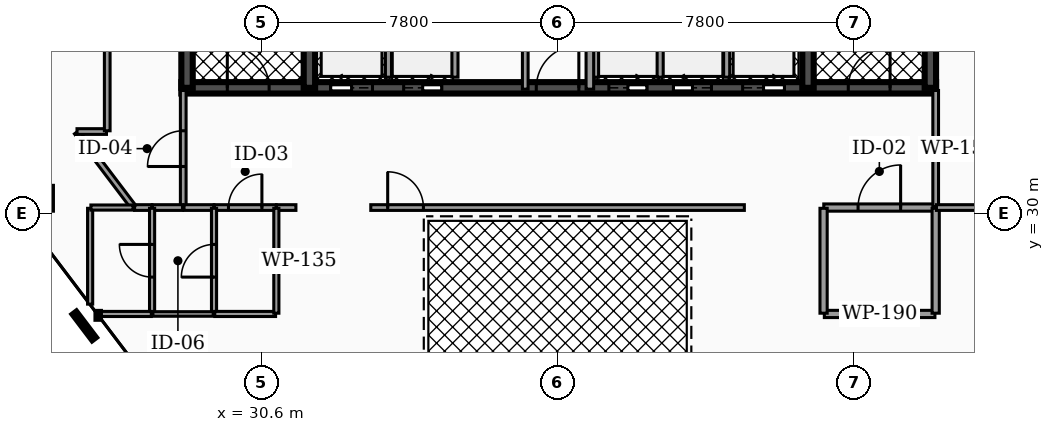
"""IFC4 building model, lengths in metres.
Left out: names, types, materials, properties, quantities, classifications, styles, units other than length and angle.
Written with IfcOpenShell. Run it as: python <this file> out.ifc"""

import sys

from ifc_helpers import new_model, si_unit, direction, frame, frame_2d, origin, origin_2d, place, context, subcontext, project, spatial, rectangle, hollow_rectangle, extrude, element, fill, save


model = new_model("IFC4")
c1 = context("Model", 3, precision=1e-05, world=origin(), true_north=direction((0.0, 1.0)))
c2 = subcontext(c1, "Body", "Model", "MODEL_VIEW")
j1 = project(units=[si_unit("LENGTHUNIT", "METRE"), si_unit("PLANEANGLEUNIT", "RADIAN")], contexts=[c1])
p1 = place(None, origin())
s1 = spatial("IfcSite", under=j1, at=p1, CompositionType="ELEMENT")
p2 = place(p1, origin())
s2 = spatial("IfcBuilding", under=s1, at=p2, CompositionType="ELEMENT")
p3 = place(p2, frame((0.0, 0.0, 246.16)))
s3 = spatial("IfcBuildingStorey", under=s2, at=p3, CompositionType="ELEMENT", Elevation=246.16)
p4 = place(p3, frame((28.5, 33.3, 0.0), z_axis=(0.0, 0.0, 1.0), x_axis=(1.0, 0.0, 0.0)))
e1 = element("IfcWall", 1, at=p4, inside=s3, PredefinedType="SHEAR", context=c2, shape_type="SweptSolid", body=[
    extrude(rectangle(XDim=19.86, YDim=0.3, at=frame_2d((9.93, 0.0))), origin(), (0.0, 0.0, 1.0), 3.18),
])
p5 = place(p4, frame((3.93, 0.0, 0.0)))
e2 = element("IfcOpeningElement", 2, at=p5, cuts=e1, PredefinedType="OPENING", context=c2, shape_type="SweptSolid", body=[
    extrude(rectangle(XDim=1.1, YDim=2.15, at=frame_2d((0.55, 1.075))), frame((0.0, 0.16, 0.0), z_axis=(0.0, -1.0, 0.0), x_axis=(1.0, 0.0, 0.0)), (0.0, 0.0, 1.0), 0.32),
])
p6 = place(p4, frame((14.77, 0.0, 0.0)))
e3 = element("IfcOpeningElement", 3, at=p6, cuts=e1, PredefinedType="OPENING", context=c2, shape_type="SweptSolid", body=[
    extrude(rectangle(XDim=1.1, YDim=2.15, at=frame_2d((0.55, 1.075))), frame((0.0, 0.16, 0.0), z_axis=(0.0, -1.0, 0.0), x_axis=(1.0, 0.0, 0.0)), (0.0, 0.0, 1.0), 0.32),
])
p7 = place(p4, frame((11.25, 0.0, 0.0)))
e4 = element("IfcOpeningElement", 4, at=p7, cuts=e1, PredefinedType="OPENING", context=c2, shape_type="SweptSolid", body=[
    extrude(rectangle(XDim=1.0, YDim=2.1, at=frame_2d((0.5, 1.05))), frame((0.0, 0.16, 0.0), z_axis=(0.0, -1.0, 0.0), x_axis=(1.0, 0.0, 0.0)), (0.0, 0.0, 1.0), 0.32),
])
p8 = place(p4, frame((12.95, 0.0, 0.0)))
e5 = element("IfcOpeningElement", 5, at=p8, cuts=e1, PredefinedType="OPENING", context=c2, shape_type="SweptSolid", body=[
    extrude(rectangle(XDim=1.0, YDim=2.1, at=frame_2d((0.5, 1.05))), frame((0.0, 0.16, 0.0), z_axis=(0.0, -1.0, 0.0), x_axis=(1.0, 0.0, 0.0)), (0.0, 0.0, 1.0), 0.32),
])
p9 = place(p4, frame((5.85, 0.0, 0.0)))
e6 = element("IfcOpeningElement", 6, at=p9, cuts=e1, PredefinedType="OPENING", context=c2, shape_type="SweptSolid", body=[
    extrude(rectangle(XDim=1.0, YDim=2.1, at=frame_2d((0.5, 1.05))), frame((0.0, 0.16, 0.0), z_axis=(0.0, -1.0, 0.0), x_axis=(1.0, 0.0, 0.0)), (0.0, 0.0, 1.0), 0.32),
])
p10 = place(p4, frame((1.21, 0.0, 0.0)))
e7 = element("IfcOpeningElement", 7, at=p10, cuts=e1, PredefinedType="OPENING", context=c2, shape_type="SweptSolid", body=[
    extrude(rectangle(XDim=1.1, YDim=2.2, at=frame_2d((0.55, 1.1))), frame((0.0, 0.16, 0.0), z_axis=(0.0, -1.0, 0.0), x_axis=(1.0, 0.0, 0.0)), (0.0, 0.0, 1.0), 0.32),
])
p11 = place(p4, frame((9.34, 0.0, 0.0)))
e8 = element("IfcOpeningElement", 8, at=p11, cuts=e1, PredefinedType="OPENING", context=c2, shape_type="SweptSolid", body=[
    extrude(rectangle(XDim=1.12, YDim=2.05, at=frame_2d((0.56, 1.025))), frame((0.0, 0.16, 0.0), z_axis=(0.0, -1.0, 0.0), x_axis=(1.0, 0.0, 0.0)), (0.0, 0.0, 1.0), 0.32),
])
p12 = place(p4, frame((17.55, 0.0, 0.0)))
e9 = element("IfcOpeningElement", 9, at=p12, cuts=e1, PredefinedType="OPENING", context=c2, shape_type="SweptSolid", body=[
    extrude(rectangle(XDim=1.1, YDim=2.2, at=frame_2d((0.55, 1.1))), frame((0.0, 0.16, 0.0), z_axis=(0.0, -1.0, 0.0), x_axis=(1.0, 0.0, 0.0)), (0.0, 0.0, 1.0), 0.32),
])
for number, where, z_axis, x_axis in (
    (10, (28.65, 33.3, 0.0), (0.0, 0.0, 1.0), (0.0, 1.0, 0.0)),
    (11, (31.87, 33.3, 0.0), (0.0, 0.0, 1.0), (0.0, 1.0, 0.0)),
    (12, (44.99, 33.3, 0.0), (0.0, 0.0, 1.0), (0.0, 1.0, 0.0)),
    (13, (48.21, 33.3, 0.0), (0.0, 0.0, 1.0), (0.0, 1.0, 0.0)),
):
    element("IfcWall", number, at=place(p3, frame(where, z_axis=z_axis, x_axis=x_axis)), inside=s3, PredefinedType="SHEAR", context=c2, shape_type="SweptSolid", body=[
        extrude(rectangle(XDim=10.1, YDim=0.3, at=frame_2d((5.05, 0.0))), origin(), (0.0, 0.0, 1.0), 3.18),
    ])
p13 = place(p3, frame((24.794, 30.394, 0.0), z_axis=(0.081334382112, 0.096489384022, 0.992005300922), x_axis=(-0.764598124332, 0.644507337637, 0.0)))
e14 = element("IfcColumn", 14, at=p13, inside=s3, PredefinedType="COLUMN", context=c2, shape_type="SweptSolid", body=[
    extrude(hollow_rectangle(XDim=0.6, YDim=0.6, WallThickness=0.03, at=origin_2d()), origin(), (0.0, 0.0, 1.0), 3.206),
])
for number, where, z_axis, x_axis in (
    (15, (33.95, 33.58, 0.0), (0.0, 0.0, 1.0), (0.0, 1.0, 0.0)),
    (16, (42.85, 33.58, 0.0), (0.0, 0.0, 1.0), (0.0, 1.0, 0.0)),
):
    element("IfcWall", number, at=place(p3, frame(where, z_axis=z_axis, x_axis=x_axis)), inside=s3, PredefinedType="SOLIDWALL", context=c2, shape_type="SweptSolid", body=[
        extrude(rectangle(XDim=2.45, YDim=0.16, at=frame_2d((1.225, 0.0))), origin(), (0.0, 0.0, 1.0), 3.18),
    ])
for number, where, z_axis, x_axis in (
    (17, (39.4, 33.58, 0.0), (0.0, 0.0, 1.0), (0.0, 1.0, 0.0)),
    (18, (41.1, 33.58, 0.0), (0.0, 0.0, 1.0), (0.0, 1.0, 0.0)),
    (19, (35.7, 33.58, 0.0), (0.0, 0.0, 1.0), (0.0, 1.0, 0.0)),
):
    element("IfcWall", number, at=place(p3, frame(where, z_axis=z_axis, x_axis=x_axis)), inside=s3, PredefinedType="SOLIDWALL", context=c2, shape_type="SweptSolid", body=[
        extrude(rectangle(XDim=2.25, YDim=0.16, at=frame_2d((1.125, 0.0))), origin(), (0.0, 0.0, 1.0), 3.18),
    ])
p14 = place(p3, frame((37.55, 33.265, 0.0), z_axis=(0.0, 0.0, 1.0), x_axis=(0.0, 1.0, 0.0)))
e20 = element("IfcWall", 20, at=p14, inside=s3, PredefinedType="PARTITIONING", context=c2, shape_type="SweptSolid", body=[
    extrude(rectangle(XDim=3.615, YDim=0.15, at=frame_2d((1.808, 0.0))), origin(), (0.0, 0.0, 1.0), 2.235),
])
p15 = place(p14, frame((1.337, 0.0, 0.0)))
e21 = element("IfcOpeningElement", 21, at=p15, cuts=e20, PredefinedType="OPENING", context=c2, shape_type="SweptSolid", body=[
    extrude(rectangle(XDim=0.94, YDim=2.05, at=frame_2d((0.47, 1.025))), frame((0.0, 0.085, 0.0), z_axis=(0.0, -1.0, 0.0), x_axis=(1.0, 0.0, 0.0)), (0.0, 0.0, 1.0), 0.17),
])
p16 = place(p3, frame((39.25, 33.265, 0.0), z_axis=(0.0, 0.0, 1.0), x_axis=(0.0, 1.0, 0.0)))
e22 = element("IfcWall", 22, at=p16, inside=s3, PredefinedType="PARTITIONING", context=c2, shape_type="SweptSolid", body=[
    extrude(rectangle(XDim=3.615, YDim=0.2, at=frame_2d((1.808, 0.0))), origin(), (0.0, 0.0, 1.0), 2.235),
])
p17 = place(p3, frame((45.405, 30.15, 0.0), z_axis=(0.0, 0.0, 1.0), x_axis=(1.0, 0.0, 0.0)))
e23 = element("IfcWall", 23, at=p17, inside=s3, PredefinedType="PARTITIONING", context=c2, shape_type="SweptSolid", body=[
    extrude(rectangle(XDim=2.925, YDim=0.19, at=frame_2d((1.462, 0.0))), origin(), (0.0, 0.0, 1.0), 2.235),
])
p18 = place(p17, frame((0.903, 0.0, 0.0)))
e24 = element("IfcOpeningElement", 24, at=p18, cuts=e23, PredefinedType="OPENING", context=c2, shape_type="SweptSolid", body=[
    extrude(rectangle(XDim=1.12, YDim=2.05, at=frame_2d((0.56, 1.025))), frame((0.0, 0.105, 0.0), z_axis=(0.0, -1.0, 0.0), x_axis=(1.0, 0.0, 0.0)), (0.0, 0.0, 1.0), 0.21),
])
p19 = place(p3, frame((28.55, 30.17, 0.0), z_axis=(0.0, 0.0, 1.0), x_axis=(0.0, 1.0, 0.0)))
e25 = element("IfcWall", 25, at=p19, inside=s3, PredefinedType="PARTITIONING", context=c2, shape_type="SweptSolid", body=[
    extrude(rectangle(XDim=3.06, YDim=0.15, at=frame_2d((1.53, 0.0))), origin(), (0.0, 0.0, 1.0), 2.235),
])
p20 = place(p19, frame((1.06, 0.0, 0.0)))
e26 = element("IfcOpeningElement", 26, at=p20, cuts=e25, PredefinedType="OPENING", context=c2, shape_type="SweptSolid", body=[
    extrude(rectangle(XDim=0.94, YDim=2.05, at=frame_2d((0.47, 1.025))), frame((0.0, 0.085, 0.0), z_axis=(0.0, -1.0, 0.0), x_axis=(1.0, 0.0, 0.0)), (0.0, 0.0, 1.0), 0.17),
])
p21 = place(p3, frame((48.35, 30.17, 0.0), z_axis=(0.0, 0.0, 1.0), x_axis=(0.0, 1.0, 0.0)))
e27 = element("IfcWall", 27, at=p21, inside=s3, PredefinedType="PARTITIONING", context=c2, shape_type="SweptSolid", body=[
    extrude(rectangle(XDim=3.06, YDim=0.15, at=frame_2d((1.53, 0.0))), origin(), (0.0, 0.0, 1.0), 2.235),
])
p22 = place(p3, frame((29.365, 30.15, 0.0), z_axis=(0.0, 0.0, 1.0), x_axis=(1.0, 0.0, 0.0)))
e28 = element("IfcWall", 28, at=p22, inside=s3, PredefinedType="PARTITIONING", context=c2, shape_type="SweptSolid", body=[
    extrude(rectangle(XDim=1.63, YDim=0.15, at=frame_2d((0.815, 0.0))), origin(), (0.0, 0.0, 1.0), 2.235),
])
p23 = place(p22, frame((0.375, 0.0, 0.0)))
e29 = element("IfcOpeningElement", 29, at=p23, cuts=e28, PredefinedType="OPENING", context=c2, shape_type="SweptSolid", body=[
    extrude(rectangle(XDim=0.88, YDim=2.05, at=frame_2d((0.44, 1.025))), frame((0.0, 0.085, 0.0), z_axis=(0.0, -1.0, 0.0), x_axis=(1.0, 0.0, 0.0)), (0.0, 0.0, 1.0), 0.17),
])
p24 = place(p3, frame((28.57, 30.15, 0.0), z_axis=(0.0, 0.0, 1.0), x_axis=(1.0, 0.0, 0.0)))
e30 = element("IfcWall", 30, at=p24, inside=s3, PredefinedType="PARTITIONING", context=c2, shape_type="SweptSolid", body=[
    extrude(rectangle(XDim=0.785, YDim=0.15, at=frame_2d((0.393, 0.0))), origin(), (0.0, 0.0, 1.0), 2.235),
])
p25 = place(p3, frame((33.485, 30.15, 0.0), z_axis=(0.0, 0.0, 1.0), x_axis=(1.0, 0.0, 0.0)))
e31 = element("IfcWall", 31, at=p25, inside=s3, PredefinedType="PARTITIONING", context=c2, shape_type="SweptSolid", body=[
    extrude(rectangle(XDim=9.83, YDim=0.15, at=frame_2d((4.915, 0.0))), origin(), (0.0, 0.0, 1.0), 2.235),
])
p26 = place(p25, frame((0.445, 0.0, 0.0)))
e32 = element("IfcOpeningElement", 32, at=p26, cuts=e31, PredefinedType="OPENING", context=c2, shape_type="SweptSolid", body=[
    extrude(rectangle(XDim=0.94, YDim=2.05, at=frame_2d((0.47, 1.025))), frame((0.0, 0.085, 0.0), z_axis=(0.0, -1.0, 0.0), x_axis=(1.0, 0.0, 0.0)), (0.0, 0.0, 1.0), 0.17),
])
p27 = place(p3, frame((31.005, 30.15, 0.0), z_axis=(0.0, 0.0, 1.0), x_axis=(1.0, 0.0, 0.0)))
e33 = element("IfcWall", 33, at=p27, inside=s3, PredefinedType="PARTITIONING", context=c2, shape_type="SweptSolid", body=[
    extrude(rectangle(XDim=0.51, YDim=0.15, at=frame_2d((0.255, 0.0))), origin(), (0.0, 0.0, 1.0), 2.235),
])
p28 = place(p3, frame((45.42, 27.35, 0.0), z_axis=(0.0, 0.0, 1.0), x_axis=(1.0, 0.0, 0.0)))
e34 = element("IfcWall", 34, at=p28, inside=s3, PredefinedType="PARTITIONING", context=c2, shape_type="SweptSolid", body=[
    extrude(rectangle(XDim=2.91, YDim=0.19, at=frame_2d((1.455, 0.0))), origin(), (0.0, 0.0, 1.0), 2.235),
])
for number, where, z_axis, x_axis in (
    (35, (45.4, 27.37, 0.0), (0.0, 0.0, 1.0), (0.0, 1.0, 0.0)),
    (36, (48.35, 27.37, 0.0), (0.0, 0.0, 1.0), (0.0, 1.0, 0.0)),
):
    element("IfcWall", number, at=place(p3, frame(where, z_axis=z_axis, x_axis=x_axis)), inside=s3, PredefinedType="PARTITIONING", context=c2, shape_type="SweptSolid", body=[
        extrude(rectangle(XDim=2.76, YDim=0.19, at=frame_2d((1.38, 0.0))), origin(), (0.0, 0.0, 1.0), 2.235),
    ])
p29 = place(p3, frame((27.27, 30.15, 0.0), z_axis=(0.0, 0.0, 1.0), x_axis=(1.0, 0.0, 0.0)))
e37 = element("IfcWall", 37, at=p29, inside=s3, PredefinedType="PARTITIONING", context=c2, shape_type="SweptSolid", body=[
    extrude(rectangle(XDim=0.455, YDim=0.15, at=frame_2d((0.228, 0.0))), origin(), (0.0, 0.0, 1.0), 2.235),
])
p30 = place(p3, frame((27.735, 30.15, 0.0), z_axis=(0.0, 0.0, 1.0), x_axis=(1.0, 0.0, 0.0)))
e38 = element("IfcWall", 38, at=p30, inside=s3, PredefinedType="PARTITIONING", context=c2, shape_type="SweptSolid", body=[
    extrude(rectangle(XDim=0.795, YDim=0.15, at=frame_2d((0.397, 0.0))), origin(), (0.0, 0.0, 1.0), 2.235),
])
p31 = place(p3, frame((48.37, 30.15, 0.0), z_axis=(0.0, 0.0, 1.0), x_axis=(1.0, 0.0, 0.0)))
e39 = element("IfcWall", 39, at=p31, inside=s3, PredefinedType="PARTITIONING", context=c2, shape_type="SweptSolid", body=[
    extrude(rectangle(XDim=1.16, YDim=0.15, at=frame_2d((0.58, 0.0))), origin(), (0.0, 0.0, 1.0), 2.235),
])
p32 = place(p3, frame((25.747, 32.134, 0.0), z_axis=(0.0, 0.0, 1.0), x_axis=(0.603931928578, -0.797035899847, 0.0)))
e40 = element("IfcWall", 40, at=p32, inside=s3, PredefinedType="PARTITIONING", context=c2, shape_type="SweptSolid", body=[
    extrude(rectangle(XDim=2.469, YDim=0.15, at=frame_2d((1.235, 0.0))), origin(), (0.0, 0.0, 1.0), 2.235),
])
p33 = place(p3, frame((25.755, 32.15, 0.0), z_axis=(0.0, 0.0, 1.0), x_axis=(1.0, 0.0, 0.0)))
e41 = element("IfcWall", 41, at=p33, inside=s3, PredefinedType="PARTITIONING", context=c2, shape_type="SweptSolid", body=[
    extrude(rectangle(XDim=0.775, YDim=0.15, at=frame_2d((0.388, 0.0))), origin(), (0.0, 0.0, 1.0), 2.235),
])
p34 = place(p3, frame((26.55, 32.17, 0.0), z_axis=(0.0, 0.0, 1.0), x_axis=(0.0, 1.0, 0.0)))
e42 = element("IfcWall", 42, at=p34, inside=s3, PredefinedType="PARTITIONING", context=c2, shape_type="SweptSolid", body=[
    extrude(rectangle(XDim=11.38, YDim=0.15, at=frame_2d((5.69, 0.0))), origin(), (0.0, 0.0, 1.0), 2.235),
])
p35 = place(p34, frame((5.22, 0.0, 0.0)))
e43 = element("IfcOpeningElement", 43, at=p35, cuts=e42, PredefinedType="OPENING", context=c2, shape_type="SweptSolid", body=[
    extrude(rectangle(XDim=0.94, YDim=2.05, at=frame_2d((0.47, 1.025))), frame((0.0, 0.085, 0.0), z_axis=(0.0, -1.0, 0.0), x_axis=(1.0, 0.0, 0.0)), (0.0, 0.0, 1.0), 0.17),
])
p36 = place(p3, frame((29.36, 27.37, 0.0), z_axis=(0.0, 0.0, 1.0), x_axis=(0.0, 1.0, 0.0)))
e44 = element("IfcWall", 44, at=p36, inside=s3, PredefinedType="PARTITIONING", context=c2, shape_type="SweptSolid", body=[
    extrude(rectangle(XDim=2.76, YDim=0.135, at=frame_2d((1.38, 0.0))), origin(), (0.0, 0.0, 1.0), 2.235),
])
p37 = place(p36, frame((0.95, 0.0, 0.0)))
e45 = element("IfcOpeningElement", 45, at=p37, cuts=e44, PredefinedType="OPENING", context=c2, shape_type="SweptSolid", body=[
    extrude(rectangle(XDim=0.86, YDim=2.05, at=frame_2d((0.43, 1.025))), frame((0.0, 0.077, 0.0), z_axis=(0.0, -1.0, 0.0), x_axis=(1.0, 0.0, 0.0)), (0.0, 0.0, 1.0), 0.155),
])
p38 = place(p3, frame((29.38, 27.35, 0.0), z_axis=(0.0, 0.0, 1.0), x_axis=(1.0, 0.0, 0.0)))
e46 = element("IfcWall", 46, at=p38, inside=s3, PredefinedType="PARTITIONING", context=c2, shape_type="SweptSolid", body=[
    extrude(rectangle(XDim=1.6, YDim=0.135, at=frame_2d((0.8, 0.0))), origin(), (0.0, 0.0, 1.0), 2.235),
])
p39 = place(p3, frame((31.0, 27.37, 0.0), z_axis=(0.0, 0.0, 1.0), x_axis=(0.0, 1.0, 0.0)))
e47 = element("IfcWall", 47, at=p39, inside=s3, PredefinedType="PARTITIONING", context=c2, shape_type="SweptSolid", body=[
    extrude(rectangle(XDim=2.76, YDim=0.135, at=frame_2d((1.38, 0.0))), origin(), (0.0, 0.0, 1.0), 2.235),
])
p40 = place(p3, frame((27.73, 27.37, 0.0), z_axis=(0.0, 0.0, 1.0), x_axis=(0.0, 1.0, 0.0)))
e48 = element("IfcWall", 48, at=p40, inside=s3, PredefinedType="PARTITIONING", context=c2, shape_type="SweptSolid", body=[
    extrude(rectangle(XDim=2.76, YDim=0.135, at=frame_2d((1.38, 0.0))), origin(), (0.0, 0.0, 1.0), 2.235),
])
p41 = place(p40, frame((0.95, 0.0, 0.0)))
e49 = element("IfcOpeningElement", 49, at=p41, cuts=e48, PredefinedType="OPENING", context=c2, shape_type="SweptSolid", body=[
    extrude(rectangle(XDim=0.86, YDim=2.05, at=frame_2d((0.43, 1.025))), frame((0.0, 0.077, 0.0), z_axis=(0.0, -1.0, 0.0), x_axis=(1.0, 0.0, 0.0)), (0.0, 0.0, 1.0), 0.155),
])
p42 = place(p3, frame((26.3, 27.35, 0.0), z_axis=(0.0, 0.0, 1.0), x_axis=(1.0, 0.0, 0.0)))
e50 = element("IfcWall", 50, at=p42, inside=s3, PredefinedType="PARTITIONING", context=c2, shape_type="SweptSolid", body=[
    extrude(rectangle(XDim=1.41, YDim=0.135, at=frame_2d((0.705, 0.0))), origin(), (0.0, 0.0, 1.0), 2.235),
])
p43 = place(p3, frame((26.1, 27.609, 0.0), z_axis=(0.0, 0.0, 1.0), x_axis=(0.0, 1.0, 0.0)))
e51 = element("IfcWall", 51, at=p43, inside=s3, PredefinedType="PARTITIONING", context=c2, shape_type="SweptSolid", body=[
    extrude(rectangle(XDim=2.521, YDim=0.135, at=frame_2d((1.26, 0.0))), origin(), (0.0, 0.0, 1.0), 2.235),
])
p44 = place(p3, frame((26.12, 30.15, 0.0), z_axis=(0.0, 0.0, 1.0), x_axis=(1.0, 0.0, 0.0)))
e52 = element("IfcWall", 52, at=p44, inside=s3, PredefinedType="PARTITIONING", context=c2, shape_type="SweptSolid", body=[
    extrude(rectangle(XDim=1.11, YDim=0.135, at=frame_2d((0.555, 0.0))), origin(), (0.0, 0.0, 1.0), 2.235),
])
p45 = place(p3, frame((27.75, 27.35, 0.0), z_axis=(0.0, 0.0, 1.0), x_axis=(1.0, 0.0, 0.0)))
e53 = element("IfcWall", 53, at=p45, inside=s3, PredefinedType="PARTITIONING", context=c2, shape_type="SweptSolid", body=[
    extrude(rectangle(XDim=1.59, YDim=0.12, at=frame_2d((0.795, 0.0))), origin(), (0.0, 0.0, 1.0), 2.235),
])
p46 = place(p5, origin())
e54 = element("IfcDoor", 54, at=p46, inside=s3, OperationType="SLIDING_TO_LEFT", PredefinedType="DOOR", context=c2, shape_type="SweptSolid", body=[
    extrude(rectangle(XDim=1.1, YDim=2.15, at=frame_2d((0.55, 1.075))), frame((0.0, 0.025, 0.0), z_axis=(0.0, -1.0, 0.0), x_axis=(1.0, 0.0, 0.0)), (0.0, 0.0, 1.0), 0.05),
])
fill(e2, e54)
p47 = place(p6, origin())
e55 = element("IfcDoor", 55, at=p47, inside=s3, OperationType="SLIDING_TO_RIGHT", PredefinedType="DOOR", context=c2, shape_type="SweptSolid", body=[
    extrude(rectangle(XDim=1.1, YDim=2.15, at=frame_2d((0.55, 1.075))), frame((0.0, 0.025, 0.0), z_axis=(0.0, -1.0, 0.0), x_axis=(1.0, 0.0, 0.0)), (0.0, 0.0, 1.0), 0.05),
])
fill(e3, e55)
p48 = place(p7, origin())
e56 = element("IfcDoor", 56, at=p48, inside=s3, OperationType="SLIDING_TO_RIGHT", PredefinedType="DOOR", context=c2, shape_type="SweptSolid", body=[
    extrude(rectangle(XDim=1.0, YDim=2.1, at=frame_2d((0.5, 1.05))), frame((0.0, 0.025, 0.0), z_axis=(0.0, -1.0, 0.0), x_axis=(1.0, 0.0, 0.0)), (0.0, 0.0, 1.0), 0.05),
])
fill(e4, e56)
p49 = place(p8, origin())
e57 = element("IfcDoor", 57, at=p49, inside=s3, OperationType="SLIDING_TO_LEFT", PredefinedType="DOOR", context=c2, shape_type="SweptSolid", body=[
    extrude(rectangle(XDim=1.0, YDim=2.1, at=frame_2d((0.5, 1.05))), frame((0.0, 0.025, 0.0), z_axis=(0.0, -1.0, 0.0), x_axis=(1.0, 0.0, 0.0)), (0.0, 0.0, 1.0), 0.05),
])
fill(e5, e57)
p50 = place(p9, origin())
e58 = element("IfcDoor", 58, at=p50, inside=s3, OperationType="SLIDING_TO_RIGHT", PredefinedType="DOOR", context=c2, shape_type="SweptSolid", body=[
    extrude(rectangle(XDim=1.0, YDim=2.1, at=frame_2d((0.5, 1.05))), frame((0.0, 0.025, 0.0), z_axis=(0.0, -1.0, 0.0), x_axis=(1.0, 0.0, 0.0)), (0.0, 0.0, 1.0), 0.05),
])
fill(e6, e58)
p51 = place(p10, origin())
e59 = element("IfcDoor", 59, at=p51, inside=s3, OperationType="SINGLE_SWING_LEFT", PredefinedType="DOOR", context=c2, shape_type="SweptSolid", body=[
    extrude(rectangle(XDim=1.1, YDim=2.2, at=frame_2d((0.55, 1.1))), frame((0.0, 0.025, 0.0), z_axis=(0.0, -1.0, 0.0), x_axis=(1.0, 0.0, 0.0)), (0.0, 0.0, 1.0), 0.05),
])
fill(e7, e59)
p52 = place(p11, origin())
e60 = element("IfcDoor", 60, at=p52, inside=s3, OperationType="SINGLE_SWING_RIGHT", PredefinedType="DOOR", context=c2, shape_type="SweptSolid", body=[
    extrude(rectangle(XDim=1.12, YDim=2.05, at=frame_2d((0.56, 1.025))), frame((0.0, 0.025, 0.0), z_axis=(0.0, -1.0, 0.0), x_axis=(1.0, 0.0, 0.0)), (0.0, 0.0, 1.0), 0.05),
])
fill(e8, e60)
p53 = place(p12, origin())
e61 = element("IfcDoor", 61, at=p53, inside=s3, OperationType="SINGLE_SWING_RIGHT", PredefinedType="DOOR", context=c2, shape_type="SweptSolid", body=[
    extrude(rectangle(XDim=1.1, YDim=2.2, at=frame_2d((0.55, 1.1))), frame((0.0, 0.025, 0.0), z_axis=(0.0, -1.0, 0.0), x_axis=(1.0, 0.0, 0.0)), (0.0, 0.0, 1.0), 0.05),
])
fill(e9, e61)
p54 = place(p18, origin())
e62 = element("IfcDoor", 62, at=p54, inside=s3, OperationType="SINGLE_SWING_RIGHT", PredefinedType="DOOR", context=c2, shape_type="SweptSolid", body=[
    extrude(rectangle(XDim=1.12, YDim=2.05, at=frame_2d((0.56, 1.025))), frame((0.0, 0.025, 0.0), z_axis=(0.0, -1.0, 0.0), x_axis=(1.0, 0.0, 0.0)), (0.0, 0.0, 1.0), 0.05),
])
fill(e24, e62)
p55 = place(p20, origin())
e63 = element("IfcDoor", 63, at=p55, inside=s3, OperationType="SINGLE_SWING_LEFT", PredefinedType="DOOR", context=c2, shape_type="SweptSolid", body=[
    extrude(rectangle(XDim=0.94, YDim=2.05, at=frame_2d((0.47, 1.025))), frame((0.0, 0.025, 0.0), z_axis=(0.0, -1.0, 0.0), x_axis=(1.0, 0.0, 0.0)), (0.0, 0.0, 1.0), 0.05),
])
fill(e26, e63)
p56 = place(p23, origin())
e64 = element("IfcDoor", 64, at=p56, inside=s3, OperationType="SINGLE_SWING_RIGHT", PredefinedType="DOOR", context=c2, shape_type="SweptSolid", body=[
    extrude(rectangle(XDim=0.88, YDim=2.05, at=frame_2d((0.44, 1.025))), frame((0.0, 0.025, 0.0), z_axis=(0.0, -1.0, 0.0), x_axis=(1.0, 0.0, 0.0)), (0.0, 0.0, 1.0), 0.05),
])
fill(e29, e64)
p57 = place(p26, origin())
e65 = element("IfcDoor", 65, at=p57, inside=s3, OperationType="SINGLE_SWING_LEFT", PredefinedType="DOOR", context=c2, shape_type="SweptSolid", body=[
    extrude(rectangle(XDim=0.94, YDim=2.05, at=frame_2d((0.47, 1.025))), frame((0.0, 0.025, 0.0), z_axis=(0.0, -1.0, 0.0), x_axis=(1.0, 0.0, 0.0)), (0.0, 0.0, 1.0), 0.05),
])
fill(e32, e65)
p58 = place(p37, origin())
e66 = element("IfcDoor", 66, at=p58, inside=s3, OperationType="SINGLE_SWING_LEFT", PredefinedType="DOOR", context=c2, shape_type="SweptSolid", body=[
    extrude(rectangle(XDim=0.86, YDim=2.05, at=frame_2d((0.43, 1.025))), frame((0.0, 0.025, 0.0), z_axis=(0.0, -1.0, 0.0), x_axis=(1.0, 0.0, 0.0)), (0.0, 0.0, 1.0), 0.05),
])
fill(e45, e66)
p59 = place(p41, origin())
e67 = element("IfcDoor", 67, at=p59, inside=s3, OperationType="SINGLE_SWING_RIGHT", PredefinedType="DOOR", context=c2, shape_type="SweptSolid", body=[
    extrude(rectangle(XDim=0.86, YDim=2.05, at=frame_2d((0.43, 1.025))), frame((0.0, 0.025, 0.0), z_axis=(0.0, -1.0, 0.0), x_axis=(1.0, 0.0, 0.0)), (0.0, 0.0, 1.0), 0.05),
])
fill(e49, e67)
save(model, sys.argv[1])
